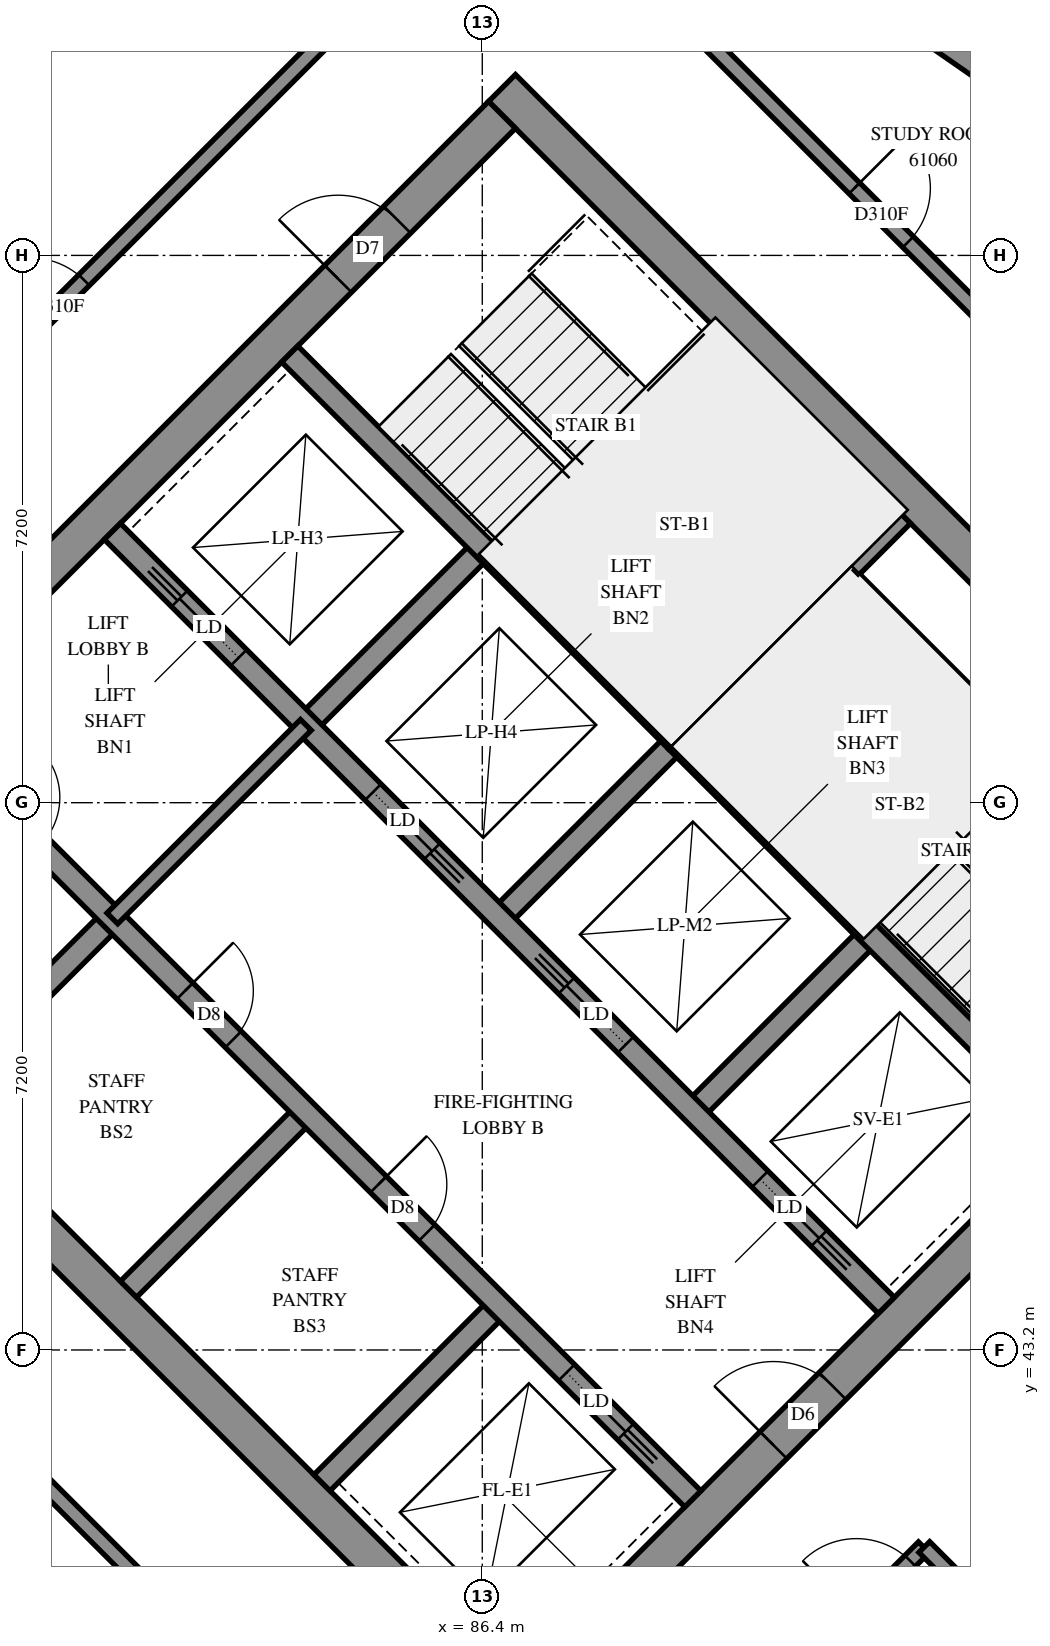
"""IFC4 building model, lengths in metres.
Left out: names, types, materials, properties, quantities, classifications, styles, units other than length and angle.
Written with IfcOpenShell. Run it as: python <this file> out.ifc"""

import sys

from ifc_helpers import new_model, si_unit, direction, frame, frame_2d, origin, place, context, subcontext, project, spatial, polyline, rectangle, outline, extrude, element, fill, save


model = new_model("IFC4")
c1 = context("Model", 3, precision=1e-05, world=origin(), true_north=direction((0.0, 1.0)))
c2 = subcontext(c1, "Body", "Model", "MODEL_VIEW")
j1 = project(units=[si_unit("LENGTHUNIT", "METRE"), si_unit("PLANEANGLEUNIT", "RADIAN")], contexts=[c1])
p1 = place(None, origin())
s1 = spatial("IfcSite", under=j1, at=p1, CompositionType="ELEMENT")
p2 = place(p1, origin())
s2 = spatial("IfcBuilding", under=s1, at=p2, CompositionType="ELEMENT")
p3 = place(p2, frame((0.0, 0.0, 223.6)))
s3 = spatial("IfcBuildingStorey", under=s2, at=p3, CompositionType="ELEMENT", Elevation=223.6)
p4 = place(p3, frame((76.124, 49.267, -0.3), z_axis=(0.0, 0.0, 1.0), x_axis=(0.7071067812, -0.7071067812, 0.0)))
e1 = element("IfcWall", 1, at=p4, inside=s3, PredefinedType="SHEAR", context=c2, shape_type="SweptSolid", body=[
    extrude(rectangle(XDim=15.4, YDim=0.5, at=frame_2d((7.7, 0.0))), origin(), (0.0, 0.0, 1.0), 2.7),
])
p5 = place(p3, frame((86.66, 59.802, -0.3), z_axis=(0.0, 0.0, 1.0), x_axis=(0.7071067812, -0.7071067812, 0.0)))
e2 = element("IfcWall", 2, at=p5, inside=s3, PredefinedType="SHEAR", context=c2, shape_type="SweptSolid", body=[
    extrude(rectangle(XDim=15.4, YDim=0.5, at=frame_2d((7.7, 0.0))), origin(), (0.0, 0.0, 1.0), 2.7),
])
p6 = place(p5, frame((10.5, 0.0, 0.3)))
e3 = element("IfcOpeningElement", 3, at=p6, cuts=e2, PredefinedType="OPENING", context=c2, shape_type="SweptSolid", body=[
    extrude(rectangle(XDim=0.8, YDim=2.1, at=frame_2d((0.4, 1.05))), frame((0.0, 0.26, 0.0), z_axis=(0.0, -1.0, 0.0), x_axis=(1.0, 0.0, 0.0)), (0.0, 0.0, 1.0), 0.52),
])
p7 = place(p3, frame((76.478, 49.267, -0.3), z_axis=(0.0, 0.0, 1.0), x_axis=(0.7071067812, 0.7071067812, 0.0)))
e4 = element("IfcWall", 4, at=p7, inside=s3, PredefinedType="SHEAR", context=c2, shape_type="SweptSolid", body=[
    extrude(rectangle(XDim=14.4, YDim=0.5, at=frame_2d((7.2, 0.0))), origin(), (0.0, 0.0, 1.0), 2.7),
])
p8 = place(p7, frame((4.55, 0.0, 0.3)))
e5 = element("IfcOpeningElement", 5, at=p8, cuts=e4, PredefinedType="OPENING", context=c2, shape_type="SweptSolid", body=[
    extrude(rectangle(XDim=1.1, YDim=2.1, at=frame_2d((0.55, 1.05))), frame((0.0, 0.26, 0.0), z_axis=(0.0, -1.0, 0.0), x_axis=(1.0, 0.0, 0.0)), (0.0, 0.0, 1.0), 0.52),
])
p9 = place(p7, frame((11.35, 0.0, 0.3)))
e6 = element("IfcOpeningElement", 6, at=p9, cuts=e4, PredefinedType="OPENING", context=c2, shape_type="SweptSolid", body=[
    extrude(rectangle(XDim=1.1, YDim=2.1, at=frame_2d((0.55, 1.05))), frame((0.0, 0.26, 0.0), z_axis=(0.0, -1.0, 0.0), x_axis=(1.0, 0.0, 0.0)), (0.0, 0.0, 1.0), 0.52),
])
p10 = place(p3, frame((87.013, 38.731, -0.3), z_axis=(0.0, 0.0, 1.0), x_axis=(0.7071067812, 0.7071067812, 0.0)))
e7 = element("IfcWall", 7, at=p10, inside=s3, PredefinedType="SHEAR", context=c2, shape_type="SweptSolid", body=[
    extrude(rectangle(XDim=14.4, YDim=0.5, at=frame_2d((7.2, 0.0))), origin(), (0.0, 0.0, 1.0), 2.7),
])
p11 = place(p10, frame((4.55, 0.0, 0.3)))
e8 = element("IfcOpeningElement", 8, at=p11, cuts=e7, PredefinedType="OPENING", context=c2, shape_type="SweptSolid", body=[
    extrude(rectangle(XDim=1.1, YDim=2.1, at=frame_2d((0.55, 1.05))), frame((0.0, 0.26, 0.0), z_axis=(0.0, -1.0, 0.0), x_axis=(1.0, 0.0, 0.0)), (0.0, 0.0, 1.0), 0.52),
])
p12 = place(p10, frame((11.35, 0.0, 0.3)))
e9 = element("IfcOpeningElement", 9, at=p12, cuts=e7, PredefinedType="OPENING", context=c2, shape_type="SweptSolid", body=[
    extrude(rectangle(XDim=1.1, YDim=2.1, at=frame_2d((0.55, 1.05))), frame((0.0, 0.26, 0.0), z_axis=(0.0, -1.0, 0.0), x_axis=(1.0, 0.0, 0.0)), (0.0, 0.0, 1.0), 0.52),
])
for number, where, z_axis, x_axis in (
    (10, (79.2, 46.544, 0.0), (0.0, 0.0, 1.0), (0.707, 0.707, 0.0)),
    (11, (84.079, 51.423, 0.0), (0.0, 0.0, 1.0), (0.707, 0.707, 0.0)),
):
    element("IfcWall", number, at=place(p3, frame(where, z_axis=z_axis, x_axis=x_axis)), inside=s3, PredefinedType="SOLIDWALL", context=c2, shape_type="SweptSolid", body=[
        extrude(rectangle(XDim=3.3, YDim=0.3, at=frame_2d((1.65, 0.0))), origin(), (0.0, 0.0, 1.0), 3.1),
    ])
p13 = place(p3, frame((81.746, 43.999, 0.0), z_axis=(0.0, 0.0, 1.0), x_axis=(0.7071067812, 0.7071067812, 0.0)))
e12 = element("IfcWall", 12, at=p13, inside=s3, PredefinedType="SOLIDWALL", context=c2, shape_type="SweptSolid", body=[
    extrude(rectangle(XDim=3.3, YDim=0.3, at=frame_2d((1.65, 0.0))), origin(), (0.0, 0.0, 1.0), 3.1),
])
p14 = place(p3, frame((86.625, 48.878, 0.0), z_axis=(0.0, 0.0, 1.0), x_axis=(0.7071067812, 0.7071067812, 0.0)))
e13 = element("IfcWall", 13, at=p14, inside=s3, PredefinedType="SOLIDWALL", context=c2, shape_type="SweptSolid", body=[
    extrude(rectangle(XDim=3.3, YDim=0.3, at=frame_2d((1.65, 0.0))), origin(), (0.0, 0.0, 1.0), 3.1),
])
p15 = place(p3, frame((84.291, 41.453, 0.0), z_axis=(0.0, 0.0, 1.0), x_axis=(0.7071067812, 0.7071067812, 0.0)))
e14 = element("IfcWall", 14, at=p15, inside=s3, PredefinedType="SOLIDWALL", context=c2, shape_type="SweptSolid", body=[
    extrude(rectangle(XDim=3.3, YDim=0.3, at=frame_2d((1.65, 0.0))), origin(), (0.0, 0.0, 1.0), 3.1),
])
p16 = place(p3, frame((89.17, 46.332, 0.0), z_axis=(0.0, 0.0, 1.0), x_axis=(0.7071067812, 0.7071067812, 0.0)))
e15 = element("IfcWall", 15, at=p16, inside=s3, PredefinedType="SOLIDWALL", context=c2, shape_type="SweptSolid", body=[
    extrude(rectangle(XDim=3.3, YDim=0.3, at=frame_2d((1.65, 0.0))), origin(), (0.0, 0.0, 1.0), 3.1),
])
p17 = place(p3, frame((78.988, 51.423, 0.0), z_axis=(0.0, 0.0, 1.0), x_axis=(0.7071067812, -0.7071067812, 0.0)))
e16 = element("IfcWall", 16, at=p17, inside=s3, PredefinedType="SOLIDWALL", context=c2, shape_type="SweptSolid", body=[
    extrude(rectangle(XDim=14.4, YDim=0.3, at=frame_2d((7.2, 0.0))), origin(), (0.0, 0.0, 1.0), 3.1),
])
p18 = place(p17, frame((1.35, 0.0, 0.0)))
e17 = element("IfcOpeningElement", 17, at=p18, cuts=e16, PredefinedType="OPENING", context=c2, shape_type="SweptSolid", body=[
    extrude(rectangle(XDim=0.9, YDim=2.1, at=frame_2d((0.45, 1.05))), frame((0.0, 0.16, 0.0), z_axis=(0.0, -1.0, 0.0), x_axis=(1.0, 0.0, 0.0)), (0.0, 0.0, 1.0), 0.32),
])
p19 = place(p17, frame((4.95, 0.0, 0.0)))
e18 = element("IfcOpeningElement", 18, at=p19, cuts=e16, PredefinedType="OPENING", context=c2, shape_type="SweptSolid", body=[
    extrude(rectangle(XDim=0.9, YDim=2.1, at=frame_2d((0.45, 1.05))), frame((0.0, 0.16, 0.0), z_axis=(0.0, -1.0, 0.0), x_axis=(1.0, 0.0, 0.0)), (0.0, 0.0, 1.0), 0.32),
])
p20 = place(p17, frame((8.55, 0.0, 0.0)))
e19 = element("IfcOpeningElement", 19, at=p20, cuts=e16, PredefinedType="OPENING", context=c2, shape_type="SweptSolid", body=[
    extrude(rectangle(XDim=0.9, YDim=2.1, at=frame_2d((0.45, 1.05))), frame((0.0, 0.16, 0.0), z_axis=(0.0, -1.0, 0.0), x_axis=(1.0, 0.0, 0.0)), (0.0, 0.0, 1.0), 0.32),
])
p21 = place(p17, frame((12.05, 0.0, 0.0)))
e20 = element("IfcOpeningElement", 20, at=p21, cuts=e16, PredefinedType="OPENING", context=c2, shape_type="SweptSolid", body=[
    extrude(rectangle(XDim=1.1, YDim=2.1, at=frame_2d((0.55, 1.05))), frame((0.0, 0.16, 0.0), z_axis=(0.0, -1.0, 0.0), x_axis=(1.0, 0.0, 0.0)), (0.0, 0.0, 1.0), 0.32),
])
p22 = place(p3, frame((81.534, 53.969, 0.0), z_axis=(0.0, 0.0, 1.0), x_axis=(0.707103309, -0.7071102534, 0.0)))
e21 = element("IfcWall", 21, at=p22, inside=s3, PredefinedType="SOLIDWALL", context=c2, shape_type="SweptSolid", body=[
    extrude(rectangle(XDim=14.4, YDim=0.3, at=frame_2d((7.2, 0.0))), origin(), (0.0, 0.0, 1.0), 3.1),
])
p23 = place(p22, frame((1.25, 0.0, 0.0)))
e22 = element("IfcOpeningElement", 22, at=p23, cuts=e21, PredefinedType="OPENING", context=c2, shape_type="SweptSolid", body=[
    extrude(rectangle(XDim=1.1, YDim=2.1, at=frame_2d((0.55, 1.05))), frame((0.0, 0.16, 0.0), z_axis=(0.0, -1.0, 0.0), x_axis=(1.0, 0.0, 0.0)), (0.0, 0.0, 1.0), 0.32),
])
p24 = place(p22, frame((4.85, 0.0, 0.0)))
e23 = element("IfcOpeningElement", 23, at=p24, cuts=e21, PredefinedType="OPENING", context=c2, shape_type="SweptSolid", body=[
    extrude(rectangle(XDim=1.1, YDim=2.1, at=frame_2d((0.55, 1.05))), frame((0.0, 0.16, 0.0), z_axis=(0.0, -1.0, 0.0), x_axis=(1.0, 0.0, 0.0)), (0.0, 0.0, 1.0), 0.32),
])
p25 = place(p22, frame((8.45, 0.0, 0.0)))
e24 = element("IfcOpeningElement", 24, at=p25, cuts=e21, PredefinedType="OPENING", context=c2, shape_type="SweptSolid", body=[
    extrude(rectangle(XDim=1.1, YDim=2.1, at=frame_2d((0.55, 1.05))), frame((0.0, 0.16, 0.0), z_axis=(0.0, -1.0, 0.0), x_axis=(1.0, 0.0, 0.0)), (0.0, 0.0, 1.0), 0.32),
])
p26 = place(p22, frame((12.05, 0.0, 0.0)))
e25 = element("IfcOpeningElement", 25, at=p26, cuts=e21, PredefinedType="OPENING", context=c2, shape_type="SweptSolid", body=[
    extrude(rectangle(XDim=1.1, YDim=2.1, at=frame_2d((0.55, 1.05))), frame((0.0, 0.16, 0.0), z_axis=(0.0, -1.0, 0.0), x_axis=(1.0, 0.0, 0.0)), (0.0, 0.0, 1.0), 0.32),
])
for number, where, z_axis, x_axis in (
    (26, (83.867, 56.302, 0.0), (0.0, 0.0, 1.0), (0.707, -0.707, 0.0)),
    (27, (88.958, 51.211, 0.0), (0.0, 0.0, 1.0), (0.707, -0.707, 0.0)),
):
    element("IfcWall", number, at=place(p3, frame(where, z_axis=z_axis, x_axis=x_axis)), inside=s3, PredefinedType="SOLIDWALL", context=c2, shape_type="SweptSolid", body=[
        extrude(rectangle(XDim=7.2, YDim=0.3, at=frame_2d((3.6, 0.0))), origin(), (0.0, 0.0, 1.0), 3.1),
    ])
p27 = place(p3, frame((88.958, 51.211, 0.0), z_axis=(0.0, 0.0, 1.0), x_axis=(0.7071067812, 0.7071067812, 0.0)))
e28 = element("IfcWall", 28, at=p27, inside=s3, PredefinedType="SOLIDWALL", context=c2, shape_type="SweptSolid", body=[
    extrude(rectangle(XDim=4.2, YDim=0.3, at=frame_2d((2.1, 0.0))), origin(), (0.0, 0.0, 1.0), 3.1),
])
p28 = place(p3, frame((93.76, 59.631, 0.0), z_axis=(0.0, 0.0, 1.0), x_axis=(-0.8215041665, 0.5702025117, 0.0)))
e29 = element("IfcWall", 29, at=p28, inside=s3, PredefinedType="SOLIDWALL", context=c2, shape_type="SweptSolid", body=[
    extrude(outline(polyline([(-0.045, -0.25), (3.348, -0.25), (3.439, 0.25), (0.045, 0.25), (-0.045, -0.25)])), origin(), (0.0, 0.0, 1.0), 3.1),
])
p29 = place(p28, frame((1.526, 0.0, 0.45)))
e30 = element("IfcOpeningElement", 30, at=p29, cuts=e29, PredefinedType="OPENING", context=c2, shape_type="SweptSolid", body=[
    extrude(rectangle(XDim=1.2, YDim=2.5, at=frame_2d((0.6, 1.25))), frame((0.0, 0.26, 0.0), z_axis=(0.0, -1.0, 0.0), x_axis=(1.0, 0.0, 0.0)), (0.0, 0.0, 1.0), 0.52),
])
p30 = place(p3, frame((91.313, 53.354, 0.0), z_axis=(0.0, 0.0, 1.0), x_axis=(0.7071147811, -0.7070987812, 0.0)))
e31 = element("IfcWall", 31, at=p30, inside=s3, PredefinedType="PARTITIONING", context=c2, shape_type="SweptSolid", body=[
    extrude(rectangle(XDim=6.25, YDim=0.15, at=frame_2d((3.125, 0.0))), origin(), (0.0, 0.0, 1.0), 3.1),
])
p31 = place(p3, frame((81.534, 48.878, 0.0), z_axis=(0.0, 0.0, 1.0), x_axis=(0.707092892, 0.7071206701, 0.0)))
e32 = element("IfcWall", 32, at=p31, inside=s3, PredefinedType="PARTITIONING", context=c2, shape_type="SweptSolid", body=[
    extrude(rectangle(XDim=3.6, YDim=0.2, at=frame_2d((1.8, 0.0))), origin(), (0.0, 0.0, 1.0), 3.1),
])
p32 = place(p3, frame((79.799, 55.913, 0.0), z_axis=(0.0, 0.0, 1.0), x_axis=(0.7071067812, 0.7071067812, 0.0)))
e33 = element("IfcWall", 33, at=p32, inside=s3, PredefinedType="PARTITIONING", context=c2, shape_type="SweptSolid", body=[
    extrude(rectangle(XDim=9.95, YDim=0.2, at=frame_2d((4.975, 0.0))), origin(), (0.0, 0.0, 1.0), 3.1),
])
p33 = place(p32, frame((0.927, 0.0, 0.0)))
e34 = element("IfcOpeningElement", 34, at=p33, cuts=e33, PredefinedType="OPENING", context=c2, shape_type="SweptSolid", body=[
    extrude(rectangle(XDim=1.0, YDim=2.1, at=frame_2d((0.5, 1.05))), frame((0.0, 0.11, 0.0), z_axis=(0.0, -1.0, 0.0), x_axis=(1.0, 0.0, 0.0)), (0.0, 0.0, 1.0), 0.22),
])
p34 = place(p3, frame((86.835, 62.945, 0.0), z_axis=(0.0, 0.0, 1.0), x_axis=(0.7071067812, -0.7071067812, 0.0)))
e35 = element("IfcWall", 35, at=p34, inside=s3, PredefinedType="PARTITIONING", context=c2, shape_type="SweptSolid", body=[
    extrude(rectangle(XDim=9.798, YDim=0.2, at=frame_2d((4.899, 0.0))), origin(), (0.0, 0.0, 1.0), 3.1),
])
p35 = place(p34, frame((6.308, 0.0, 0.0)))
e36 = element("IfcOpeningElement", 36, at=p35, cuts=e35, PredefinedType="OPENING", context=c2, shape_type="SweptSolid", body=[
    extrude(rectangle(XDim=1.0, YDim=2.1, at=frame_2d((0.5, 1.05))), frame((0.0, 0.11, 0.0), z_axis=(0.0, -1.0, 0.0), x_axis=(1.0, 0.0, 0.0)), (0.0, 0.0, 1.0), 0.22),
])
p36 = place(p3, frame((86.835, 35.231, 0.0), z_axis=(0.0, 0.0, 1.0), x_axis=(0.7071067812, 0.7071067812, 0.0)))
e37 = element("IfcWall", 37, at=p36, inside=s3, PredefinedType="PARTITIONING", context=c2, shape_type="SweptSolid", body=[
    extrude(rectangle(XDim=7.6, YDim=0.2, at=frame_2d((3.8, 0.0))), origin(), (0.0, 0.0, 1.0), 3.1),
])
p37 = place(p36, frame((6.346, 0.0, 0.0)))
e38 = element("IfcOpeningElement", 38, at=p37, cuts=e37, PredefinedType="OPENING", context=c2, shape_type="SweptSolid", body=[
    extrude(rectangle(XDim=1.0, YDim=2.1, at=frame_2d((0.5, 1.05))), frame((0.0, 0.11, 0.0), z_axis=(0.0, -1.0, 0.0), x_axis=(1.0, 0.0, 0.0)), (0.0, 0.0, 1.0), 0.22),
])
p38 = place(p3, frame((80.522, 41.553, 0.0), z_axis=(0.0, 0.0, 1.0), x_axis=(0.7071067812, -0.7071067812, 0.0)))
e39 = element("IfcWall", 39, at=p38, inside=s3, PredefinedType="PARTITIONING", context=c2, shape_type="SweptSolid", body=[
    extrude(rectangle(XDim=6.836, YDim=0.2, at=frame_2d((3.418, 0.0))), origin(), (0.0, 0.0, 1.0), 3.1),
])
p39 = place(p3, frame((92.216, 40.608, 0.0), z_axis=(0.0, 0.0, 1.0), x_axis=(0.7071067812, -0.7071067812, 0.0)))
e40 = element("IfcWall", 40, at=p39, inside=s3, PredefinedType="PARTITIONING", context=c2, shape_type="SweptSolid", body=[
    extrude(rectangle(XDim=4.599, YDim=0.2, at=frame_2d((2.3, 0.0))), origin(), (0.0, 0.0, 1.0), 3.1),
])
p40 = place(p39, frame((3.189, 0.0, 0.0)))
e41 = element("IfcOpeningElement", 41, at=p40, cuts=e40, PredefinedType="OPENING", context=c2, shape_type="SweptSolid", body=[
    extrude(rectangle(XDim=0.9, YDim=2.1, at=frame_2d((0.45, 1.05))), frame((0.0, 0.11, 0.0), z_axis=(0.0, -1.0, 0.0), x_axis=(1.0, 0.0, 0.0)), (0.0, 0.0, 1.0), 0.22),
])
p41 = place(p11, origin())
e42 = element("IfcDoor", 42, at=p41, inside=s3, OperationType="DOUBLE_DOOR_SINGLE_SWING", PredefinedType="DOOR", context=c2, shape_type="SweptSolid", body=[
    extrude(rectangle(XDim=1.1, YDim=2.1, at=frame_2d((0.55, 1.05))), frame((0.0, 0.025, 0.0), z_axis=(0.0, -1.0, 0.0), x_axis=(1.0, 0.0, 0.0)), (0.0, 0.0, 1.0), 0.05),
])
fill(e8, e42)
p42 = place(p9, origin())
e43 = element("IfcDoor", 43, at=p42, inside=s3, OperationType="SINGLE_SWING_LEFT", PredefinedType="DOOR", context=c2, shape_type="SweptSolid", body=[
    extrude(rectangle(XDim=1.1, YDim=2.1, at=frame_2d((0.55, 1.05))), frame((0.0, 0.025, 0.0), z_axis=(0.0, -1.0, 0.0), x_axis=(1.0, 0.0, 0.0)), (0.0, 0.0, 1.0), 0.05),
])
fill(e6, e43)
p43 = place(p19, origin())
e44 = element("IfcDoor", 44, at=p43, inside=s3, OperationType="SINGLE_SWING_LEFT", PredefinedType="DOOR", context=c2, shape_type="SweptSolid", body=[
    extrude(rectangle(XDim=0.9, YDim=2.1, at=frame_2d((0.45, 1.05))), frame((0.0, 0.025, 0.0), z_axis=(0.0, -1.0, 0.0), x_axis=(1.0, 0.0, 0.0)), (0.0, 0.0, 1.0), 0.05),
])
fill(e18, e44)
p44 = place(p20, origin())
e45 = element("IfcDoor", 45, at=p44, inside=s3, OperationType="SINGLE_SWING_LEFT", PredefinedType="DOOR", context=c2, shape_type="SweptSolid", body=[
    extrude(rectangle(XDim=0.9, YDim=2.1, at=frame_2d((0.45, 1.05))), frame((0.0, 0.025, 0.0), z_axis=(0.0, -1.0, 0.0), x_axis=(1.0, 0.0, 0.0)), (0.0, 0.0, 1.0), 0.05),
])
fill(e19, e45)
p45 = place(p21, origin())
e46 = element("IfcDoor", 46, at=p45, inside=s3, OperationType="SLIDING_TO_RIGHT", PredefinedType="DOOR", context=c2, shape_type="SweptSolid", body=[
    extrude(rectangle(XDim=1.1, YDim=2.1, at=frame_2d((0.55, 1.05))), frame((0.0, 0.025, 0.0), z_axis=(0.0, -1.0, 0.0), x_axis=(1.0, 0.0, 0.0)), (0.0, 0.0, 1.0), 0.05),
])
fill(e20, e46)
p46 = place(p23, origin())
e47 = element("IfcDoor", 47, at=p46, inside=s3, OperationType="SLIDING_TO_LEFT", PredefinedType="DOOR", context=c2, shape_type="SweptSolid", body=[
    extrude(rectangle(XDim=1.1, YDim=2.1, at=frame_2d((0.55, 1.05))), frame((0.0, 0.025, 0.0), z_axis=(0.0, -1.0, 0.0), x_axis=(1.0, 0.0, 0.0)), (0.0, 0.0, 1.0), 0.05),
])
fill(e22, e47)
p47 = place(p24, origin())
e48 = element("IfcDoor", 48, at=p47, inside=s3, OperationType="SLIDING_TO_RIGHT", PredefinedType="DOOR", context=c2, shape_type="SweptSolid", body=[
    extrude(rectangle(XDim=1.1, YDim=2.1, at=frame_2d((0.55, 1.05))), frame((0.0, 0.025, 0.0), z_axis=(0.0, -1.0, 0.0), x_axis=(1.0, 0.0, 0.0)), (0.0, 0.0, 1.0), 0.05),
])
fill(e23, e48)
p48 = place(p25, origin())
e49 = element("IfcDoor", 49, at=p48, inside=s3, OperationType="SLIDING_TO_LEFT", PredefinedType="DOOR", context=c2, shape_type="SweptSolid", body=[
    extrude(rectangle(XDim=1.1, YDim=2.1, at=frame_2d((0.55, 1.05))), frame((0.0, 0.025, 0.0), z_axis=(0.0, -1.0, 0.0), x_axis=(1.0, 0.0, 0.0)), (0.0, 0.0, 1.0), 0.05),
])
fill(e24, e49)
p49 = place(p26, origin())
e50 = element("IfcDoor", 50, at=p49, inside=s3, OperationType="SLIDING_TO_RIGHT", PredefinedType="DOOR", context=c2, shape_type="SweptSolid", body=[
    extrude(rectangle(XDim=1.1, YDim=2.1, at=frame_2d((0.55, 1.05))), frame((0.0, 0.025, 0.0), z_axis=(0.0, -1.0, 0.0), x_axis=(1.0, 0.0, 0.0)), (0.0, 0.0, 1.0), 0.05),
])
fill(e25, e50)
p50 = place(p33, origin())
e51 = element("IfcDoor", 51, at=p50, inside=s3, OperationType="SINGLE_SWING_RIGHT", PredefinedType="DOOR", context=c2, shape_type="SweptSolid", body=[
    extrude(rectangle(XDim=1.0, YDim=2.1, at=frame_2d((0.5, 1.05))), frame((0.0, 0.025, 0.0), z_axis=(0.0, -1.0, 0.0), x_axis=(1.0, 0.0, 0.0)), (0.0, 0.0, 1.0), 0.05),
])
fill(e34, e51)
p51 = place(p35, origin())
e52 = element("IfcDoor", 52, at=p51, inside=s3, OperationType="SINGLE_SWING_LEFT", PredefinedType="DOOR", context=c2, shape_type="SweptSolid", body=[
    extrude(rectangle(XDim=1.0, YDim=2.1, at=frame_2d((0.5, 1.05))), frame((0.0, 0.025, 0.0), z_axis=(0.0, -1.0, 0.0), x_axis=(1.0, 0.0, 0.0)), (0.0, 0.0, 1.0), 0.05),
])
fill(e36, e52)
p52 = place(p37, origin())
e53 = element("IfcDoor", 53, at=p52, inside=s3, OperationType="SINGLE_SWING_RIGHT", PredefinedType="DOOR", context=c2, shape_type="SweptSolid", body=[
    extrude(rectangle(XDim=1.0, YDim=2.1, at=frame_2d((0.5, 1.05))), frame((0.0, 0.025, 0.0), z_axis=(0.0, -1.0, 0.0), x_axis=(1.0, 0.0, 0.0)), (0.0, 0.0, 1.0), 0.05),
])
fill(e38, e53)
save(model, sys.argv[1])
